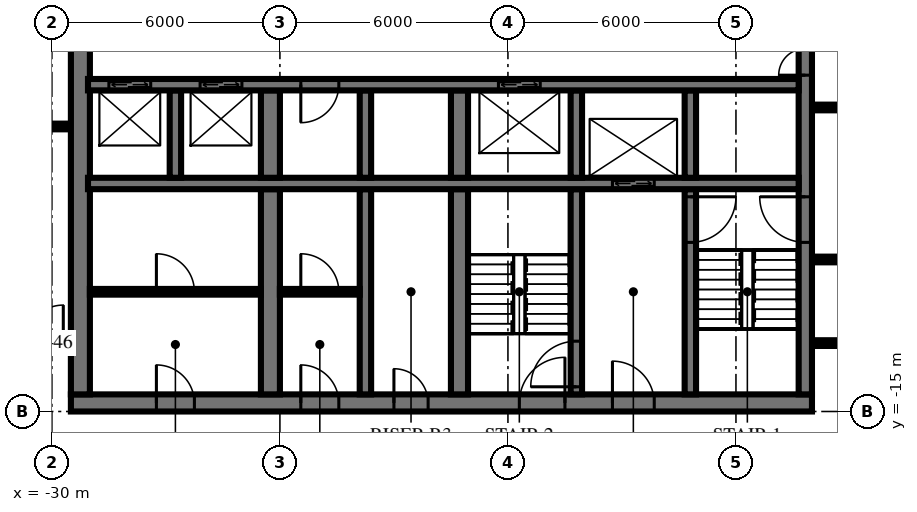
"""IFC4 building model, lengths in metres.
Left out: names, types, materials, properties, quantities, classifications, styles, units other than length and angle.
Written with IfcOpenShell. Run it as: python <this file> out.ifc"""

import sys

from ifc_helpers import new_model, si_unit, direction, frame, frame_2d, origin, place, context, subcontext, project, spatial, rectangle, extrude, element, fill, save


model = new_model("IFC4")
c1 = context("Model", 3, precision=1e-05, world=origin(), true_north=direction((0.0, 1.0)))
c2 = subcontext(c1, "Body", "Model", "MODEL_VIEW")
j1 = project(units=[si_unit("LENGTHUNIT", "METRE"), si_unit("PLANEANGLEUNIT", "RADIAN")], contexts=[c1])
p1 = place(None, origin())
s1 = spatial("IfcSite", under=j1, at=p1, CompositionType="ELEMENT")
p2 = place(p1, origin())
s2 = spatial("IfcBuilding", under=s1, at=p2, CompositionType="ELEMENT")
p3 = place(p2, frame((0.0, 0.0, 18.0)))
s3 = spatial("IfcBuildingStorey", under=s2, at=p3, CompositionType="ELEMENT", Elevation=18.0)
p4 = place(p3, frame((-29.5, -14.775, 0.0), z_axis=(0.0, 0.0, 1.0), x_axis=(1.0, 0.0, 0.0)))
e1 = element("IfcWall", 1, at=p4, inside=s3, PredefinedType="SHEAR", context=c2, shape_type="SweptSolid", body=[
    extrude(rectangle(XDim=19.5, YDim=0.45, at=frame_2d((9.75, 0.0))), origin(), (0.0, 0.0, 1.0), 6.0),
])
p5 = place(p4, frame((11.8, 0.0, 0.0)))
e2 = element("IfcOpeningElement", 2, at=p5, cuts=e1, PredefinedType="OPENING", context=c2, shape_type="SweptSolid", body=[
    extrude(rectangle(XDim=1.2, YDim=2.1, at=frame_2d((0.6, 1.05))), frame((0.0, 0.235, 0.0), z_axis=(0.0, -1.0, 0.0), x_axis=(1.0, 0.0, 0.0)), (0.0, 0.0, 1.0), 0.47),
])
p6 = place(p4, frame((14.25, 0.0, 0.0)))
e3 = element("IfcOpeningElement", 3, at=p6, cuts=e1, PredefinedType="OPENING", context=c2, shape_type="SweptSolid", body=[
    extrude(rectangle(XDim=1.1, YDim=2.1, at=frame_2d((0.55, 1.05))), frame((0.0, 0.235, 0.0), z_axis=(0.0, -1.0, 0.0), x_axis=(1.0, 0.0, 0.0)), (0.0, 0.0, 1.0), 0.47),
])
p7 = place(p4, frame((8.5, 0.0, 0.0)))
e4 = element("IfcOpeningElement", 4, at=p7, cuts=e1, PredefinedType="OPENING", context=c2, shape_type="SweptSolid", body=[
    extrude(rectangle(XDim=0.9, YDim=2.1, at=frame_2d((0.45, 1.05))), frame((0.0, 0.235, 0.0), z_axis=(0.0, -1.0, 0.0), x_axis=(1.0, 0.0, 0.0)), (0.0, 0.0, 1.0), 0.47),
])
p8 = place(p4, frame((6.05, 0.0, 0.0)))
e5 = element("IfcOpeningElement", 5, at=p8, cuts=e1, PredefinedType="OPENING", context=c2, shape_type="SweptSolid", body=[
    extrude(rectangle(XDim=1.0, YDim=2.1, at=frame_2d((0.5, 1.05))), frame((0.0, 0.235, 0.0), z_axis=(0.0, -1.0, 0.0), x_axis=(1.0, 0.0, 0.0)), (0.0, 0.0, 1.0), 0.47),
])
p9 = place(p4, frame((2.25, 0.0, 0.0)))
e6 = element("IfcOpeningElement", 6, at=p9, cuts=e1, PredefinedType="OPENING", context=c2, shape_type="SweptSolid", body=[
    extrude(rectangle(XDim=1.0, YDim=2.1, at=frame_2d((0.5, 1.05))), frame((0.0, 0.235, 0.0), z_axis=(0.0, -1.0, 0.0), x_axis=(1.0, 0.0, 0.0)), (0.0, 0.0, 1.0), 0.47),
])
p10 = place(p3, frame((-10.175, -14.55, 0.0), z_axis=(0.0, 0.0, 1.0), x_axis=(0.0, 1.0, 0.0)))
e7 = element("IfcWall", 7, at=p10, inside=s3, PredefinedType="SHEAR", context=c2, shape_type="SweptSolid", body=[
    extrude(rectangle(XDim=14.1, YDim=0.35, at=frame_2d((7.05, 0.0))), origin(), (0.0, 0.0, 1.0), 6.0),
])
p11 = place(p10, frame((8.4, 0.0, 0.0)))
e8 = element("IfcOpeningElement", 8, at=p11, cuts=e7, PredefinedType="OPENING", context=c2, shape_type="SweptSolid", body=[
    extrude(rectangle(XDim=1.4, YDim=2.4, at=frame_2d((0.7, 1.2))), frame((0.0, 0.185, 0.0), z_axis=(0.0, -1.0, 0.0), x_axis=(1.0, 0.0, 0.0)), (0.0, 0.0, 1.0), 0.37),
])
p12 = place(p10, frame((10.0, 0.0, 0.0)))
e9 = element("IfcOpeningElement", 9, at=p12, cuts=e7, PredefinedType="OPENING", context=c2, shape_type="SweptSolid", body=[
    extrude(rectangle(XDim=1.4, YDim=2.4, at=frame_2d((0.7, 1.2))), frame((0.0, 0.185, 0.0), z_axis=(0.0, -1.0, 0.0), x_axis=(1.0, 0.0, 0.0)), (0.0, 0.0, 1.0), 0.37),
])
p13 = place(p10, frame((4.0, 0.0, 0.0)))
e10 = element("IfcOpeningElement", 10, at=p13, cuts=e7, PredefinedType="OPENING", context=c2, shape_type="SweptSolid", body=[
    extrude(rectangle(XDim=1.2, YDim=2.1, at=frame_2d((0.6, 1.05))), frame((0.0, 0.185, 0.0), z_axis=(0.0, -1.0, 0.0), x_axis=(1.0, 0.0, 0.0)), (0.0, 0.0, 1.0), 0.37),
])
p14 = place(p3, frame((-29.25, -14.55, 0.0), z_axis=(0.0, 0.0, 1.0), x_axis=(0.0, 1.0, 0.0)))
e11 = element("IfcWall", 11, at=p14, inside=s3, PredefinedType="SHEAR", context=c2, shape_type="SweptSolid", body=[
    extrude(rectangle(XDim=14.1, YDim=0.5, at=frame_2d((7.05, 0.0))), origin(), (0.0, 0.0, 1.0), 6.0),
])
p15 = place(p3, frame((-29.05, -6.4, 0.0), z_axis=(0.0, 0.0, 1.0), x_axis=(1.0, 0.0, 0.0)))
e12 = element("IfcWall", 12, at=p15, inside=s3, PredefinedType="SHEAR", context=c2, shape_type="SweptSolid", body=[
    extrude(rectangle(XDim=18.7, YDim=0.3, at=frame_2d((9.35, 0.0))), origin(), (0.0, 0.0, 1.0), 6.0),
])
p16 = place(p15, frame((2.95, 0.0, 0.0)))
e13 = element("IfcOpeningElement", 13, at=p16, cuts=e12, PredefinedType="OPENING", context=c2, shape_type="SweptSolid", body=[
    extrude(rectangle(XDim=1.1, YDim=2.1, at=frame_2d((0.55, 1.05))), frame((0.0, 0.16, 0.0), z_axis=(0.0, -1.0, 0.0), x_axis=(1.0, 0.0, 0.0)), (0.0, 0.0, 1.0), 0.32),
])
p17 = place(p15, frame((0.55, 0.0, 0.0)))
e14 = element("IfcOpeningElement", 14, at=p17, cuts=e12, PredefinedType="OPENING", context=c2, shape_type="SweptSolid", body=[
    extrude(rectangle(XDim=1.1, YDim=2.1, at=frame_2d((0.55, 1.05))), frame((0.0, 0.16, 0.0), z_axis=(0.0, -1.0, 0.0), x_axis=(1.0, 0.0, 0.0)), (0.0, 0.0, 1.0), 0.32),
])
p18 = place(p15, frame((10.8, 0.0, 0.0)))
e15 = element("IfcOpeningElement", 15, at=p18, cuts=e12, PredefinedType="OPENING", context=c2, shape_type="SweptSolid", body=[
    extrude(rectangle(XDim=1.1, YDim=2.1, at=frame_2d((0.55, 1.05))), frame((0.0, 0.16, 0.0), z_axis=(0.0, -1.0, 0.0), x_axis=(1.0, 0.0, 0.0)), (0.0, 0.0, 1.0), 0.32),
])
p19 = place(p15, frame((5.6, 0.0, 0.0)))
e16 = element("IfcOpeningElement", 16, at=p19, cuts=e12, PredefinedType="OPENING", context=c2, shape_type="SweptSolid", body=[
    extrude(rectangle(XDim=1.0, YDim=2.1, at=frame_2d((0.5, 1.05))), frame((0.0, 0.16, 0.0), z_axis=(0.0, -1.0, 0.0), x_axis=(1.0, 0.0, 0.0)), (0.0, 0.0, 1.0), 0.32),
])
p20 = place(p3, frame((-29.05, -9.0, 0.0), z_axis=(0.0, 0.0, 1.0), x_axis=(1.0, 0.0, 0.0)))
e17 = element("IfcWall", 17, at=p20, inside=s3, PredefinedType="SHEAR", context=c2, shape_type="SweptSolid", body=[
    extrude(rectangle(XDim=18.7, YDim=0.3, at=frame_2d((9.35, 0.0))), origin(), (0.0, 0.0, 1.0), 6.0),
])
p21 = place(p20, frame((13.8, 0.0, 0.0)))
e18 = element("IfcOpeningElement", 18, at=p21, cuts=e17, PredefinedType="OPENING", context=c2, shape_type="SweptSolid", body=[
    extrude(rectangle(XDim=1.1, YDim=2.1, at=frame_2d((0.55, 1.05))), frame((0.0, 0.16, 0.0), z_axis=(0.0, -1.0, 0.0), x_axis=(1.0, 0.0, 0.0)), (0.0, 0.0, 1.0), 0.32),
])
p22 = place(p3, frame((-13.2, -8.85, 0.0), z_axis=(0.0, 0.0, 1.0), x_axis=(0.0, 1.0, 0.0)))
e19 = element("IfcWall", 19, at=p22, inside=s3, PredefinedType="SHEAR", context=c2, shape_type="SweptSolid", body=[
    extrude(rectangle(XDim=2.3, YDim=0.3, at=frame_2d((1.15, 0.0))), origin(), (0.0, 0.0, 1.0), 6.0),
])
p23 = place(p3, frame((-13.2, -14.55, 0.0), z_axis=(0.0, 0.0, 1.0), x_axis=(0.0, 1.0, 0.0)))
e20 = element("IfcWall", 20, at=p23, inside=s3, PredefinedType="SHEAR", context=c2, shape_type="SweptSolid", body=[
    extrude(rectangle(XDim=5.4, YDim=0.3, at=frame_2d((2.7, 0.0))), origin(), (0.0, 0.0, 1.0), 6.0),
])
p24 = place(p23, frame((4.0, 0.0, 0.0)))
e21 = element("IfcOpeningElement", 21, at=p24, cuts=e20, PredefinedType="OPENING", context=c2, shape_type="SweptSolid", body=[
    extrude(rectangle(XDim=1.2, YDim=2.1, at=frame_2d((0.6, 1.05))), frame((0.0, 0.16, 0.0), z_axis=(0.0, -1.0, 0.0), x_axis=(1.0, 0.0, 0.0)), (0.0, 0.0, 1.0), 0.32),
])
p25 = place(p3, frame((-16.2, -8.85, 0.0), z_axis=(0.0, 0.0, 1.0), x_axis=(0.0, 1.0, 0.0)))
e22 = element("IfcWall", 22, at=p25, inside=s3, PredefinedType="SHEAR", context=c2, shape_type="SweptSolid", body=[
    extrude(rectangle(XDim=2.3, YDim=0.3, at=frame_2d((1.15, 0.0))), origin(), (0.0, 0.0, 1.0), 6.0),
])
p26 = place(p3, frame((-16.2, -14.55, 0.0), z_axis=(0.0, 0.0, 1.0), x_axis=(0.0, 1.0, 0.0)))
e23 = element("IfcWall", 23, at=p26, inside=s3, PredefinedType="SHEAR", context=c2, shape_type="SweptSolid", body=[
    extrude(rectangle(XDim=5.4, YDim=0.3, at=frame_2d((2.7, 0.0))), origin(), (0.0, 0.0, 1.0), 6.0),
])
p27 = place(p26, frame((0.2, 0.0, 0.0)))
e24 = element("IfcOpeningElement", 24, at=p27, cuts=e23, PredefinedType="OPENING", context=c2, shape_type="SweptSolid", body=[
    extrude(rectangle(XDim=1.2, YDim=2.1, at=frame_2d((0.6, 1.05))), frame((0.0, 0.16, 0.0), z_axis=(0.0, -1.0, 0.0), x_axis=(1.0, 0.0, 0.0)), (0.0, 0.0, 1.0), 0.32),
])
p28 = place(p3, frame((-19.275, -8.85, 0.0), z_axis=(0.0, 0.0, 1.0), x_axis=(0.0, 1.0, 0.0)))
e25 = element("IfcWall", 25, at=p28, inside=s3, PredefinedType="SHEAR", context=c2, shape_type="SweptSolid", body=[
    extrude(rectangle(XDim=2.3, YDim=0.45, at=frame_2d((1.15, 0.0))), origin(), (0.0, 0.0, 1.0), 6.0),
])
p29 = place(p3, frame((-19.275, -14.55, 0.0), z_axis=(0.0, 0.0, 1.0), x_axis=(0.0, 1.0, 0.0)))
e26 = element("IfcWall", 26, at=p29, inside=s3, PredefinedType="SHEAR", context=c2, shape_type="SweptSolid", body=[
    extrude(rectangle(XDim=5.4, YDim=0.45, at=frame_2d((2.7, 0.0))), origin(), (0.0, 0.0, 1.0), 6.0),
])
p30 = place(p3, frame((-21.75, -8.85, 0.0), z_axis=(0.0, 0.0, 1.0), x_axis=(0.0, 1.0, 0.0)))
e27 = element("IfcWall", 27, at=p30, inside=s3, PredefinedType="SHEAR", context=c2, shape_type="SweptSolid", body=[
    extrude(rectangle(XDim=2.3, YDim=0.3, at=frame_2d((1.15, 0.0))), origin(), (0.0, 0.0, 1.0), 6.0),
])
p31 = place(p3, frame((-21.75, -14.55, 0.0), z_axis=(0.0, 0.0, 1.0), x_axis=(0.0, 1.0, 0.0)))
e28 = element("IfcWall", 28, at=p31, inside=s3, PredefinedType="SHEAR", context=c2, shape_type="SweptSolid", body=[
    extrude(rectangle(XDim=5.4, YDim=0.3, at=frame_2d((2.7, 0.0))), origin(), (0.0, 0.0, 1.0), 6.0),
])
p32 = place(p3, frame((-24.25, -8.85, 0.0), z_axis=(0.0, 0.0, 1.0), x_axis=(0.0, 1.0, 0.0)))
e29 = element("IfcWall", 29, at=p32, inside=s3, PredefinedType="SHEAR", context=c2, shape_type="SweptSolid", body=[
    extrude(rectangle(XDim=2.3, YDim=0.5, at=frame_2d((1.15, 0.0))), origin(), (0.0, 0.0, 1.0), 6.0),
])
p33 = place(p3, frame((-24.25, -14.55, 0.0), z_axis=(0.0, 0.0, 1.0), x_axis=(0.0, 1.0, 0.0)))
e30 = element("IfcWall", 30, at=p33, inside=s3, PredefinedType="SHEAR", context=c2, shape_type="SweptSolid", body=[
    extrude(rectangle(XDim=5.4, YDim=0.5, at=frame_2d((2.7, 0.0))), origin(), (0.0, 0.0, 1.0), 6.0),
])
p34 = place(p3, frame((-26.75, -8.85, 0.0), z_axis=(0.0, 0.0, 1.0), x_axis=(0.0, 1.0, 0.0)))
e31 = element("IfcWall", 31, at=p34, inside=s3, PredefinedType="SHEAR", context=c2, shape_type="SweptSolid", body=[
    extrude(rectangle(XDim=2.3, YDim=0.3, at=frame_2d((1.15, 0.0))), origin(), (0.0, 0.0, 1.0), 6.0),
])
p35 = place(p3, frame((-24.0, -11.85, 0.0), z_axis=(0.0, 0.0, 1.0), x_axis=(1.0, 0.0, 0.0)))
e32 = element("IfcWall", 32, at=p35, inside=s3, PredefinedType="PARTITIONING", context=c2, shape_type="SweptSolid", body=[
    extrude(rectangle(XDim=2.1, YDim=0.15, at=frame_2d((1.05, 0.0))), origin(), (0.0, 0.0, 1.0), 5.7),
])
p36 = place(p35, frame((0.55, 0.0, 0.0)))
e33 = element("IfcOpeningElement", 33, at=p36, cuts=e32, PredefinedType="OPENING", context=c2, shape_type="SweptSolid", body=[
    extrude(rectangle(XDim=1.0, YDim=2.1, at=frame_2d((0.5, 1.05))), frame((0.0, 0.085, 0.0), z_axis=(0.0, -1.0, 0.0), x_axis=(1.0, 0.0, 0.0)), (0.0, 0.0, 1.0), 0.17),
])
p37 = place(p3, frame((-29.0, -11.85, 0.0), z_axis=(0.0, 0.0, 1.0), x_axis=(1.0, 0.0, 0.0)))
e34 = element("IfcWall", 34, at=p37, inside=s3, PredefinedType="PARTITIONING", context=c2, shape_type="SweptSolid", body=[
    extrude(rectangle(XDim=4.5, YDim=0.15, at=frame_2d((2.25, 0.0))), origin(), (0.0, 0.0, 1.0), 5.7),
])
p38 = place(p37, frame((1.75, 0.0, 0.0)))
e35 = element("IfcOpeningElement", 35, at=p38, cuts=e34, PredefinedType="OPENING", context=c2, shape_type="SweptSolid", body=[
    extrude(rectangle(XDim=1.0, YDim=2.1, at=frame_2d((0.5, 1.05))), frame((0.0, 0.085, 0.0), z_axis=(0.0, -1.0, 0.0), x_axis=(1.0, 0.0, 0.0)), (0.0, 0.0, 1.0), 0.17),
])
p39 = place(p3, frame((-32.484, -13.2, 0.0), z_axis=(0.0, 0.0, 1.0), x_axis=(1.0, 0.0, 0.0)))
e36 = element("IfcWall", 36, at=p39, inside=s3, PredefinedType="PARTITIONING", context=c2, shape_type="SweptSolid", body=[
    extrude(rectangle(XDim=2.934, YDim=0.15, at=frame_2d((1.467, 0.0))), origin(), (0.0, 0.0, 1.0), 5.55),
])
p40 = place(p39, frame((1.784, 0.0, 0.0)))
e37 = element("IfcOpeningElement", 37, at=p40, cuts=e36, PredefinedType="OPENING", context=c2, shape_type="SweptSolid", body=[
    extrude(rectangle(XDim=1.0, YDim=2.1, at=frame_2d((0.5, 1.05))), frame((0.0, 0.085, 0.0), z_axis=(0.0, -1.0, 0.0), x_axis=(1.0, 0.0, 0.0)), (0.0, 0.0, 1.0), 0.17),
])
p41 = place(p3, frame((-9.95, -13.2, 0.0), z_axis=(0.0, 0.0, 1.0), x_axis=(1.0, 0.0, 0.0)))
e38 = element("IfcWall", 38, at=p41, inside=s3, PredefinedType="PARTITIONING", context=c2, shape_type="SweptSolid", body=[
    extrude(rectangle(XDim=19.9, YDim=0.15, at=frame_2d((9.95, 0.0))), origin(), (0.0, 0.0, 1.0), 5.55),
])
p42 = place(p41, frame((7.0, 0.0, 0.0)))
e39 = element("IfcOpeningElement", 39, at=p42, cuts=e38, PredefinedType="OPENING", context=c2, shape_type="SweptSolid", body=[
    extrude(rectangle(XDim=1.0, YDim=2.1, at=frame_2d((0.5, 1.05))), frame((0.0, 0.085, 0.0), z_axis=(0.0, -1.0, 0.0), x_axis=(1.0, 0.0, 0.0)), (0.0, 0.0, 1.0), 0.17),
])
p43 = place(p3, frame((-9.95, -11.0, 0.0), z_axis=(0.0, 0.0, 1.0), x_axis=(1.0, 0.0, 0.0)))
e40 = element("IfcWall", 40, at=p43, inside=s3, PredefinedType="PARTITIONING", context=c2, shape_type="SweptSolid", body=[
    extrude(rectangle(XDim=19.9, YDim=0.15, at=frame_2d((9.95, 0.0))), origin(), (0.0, 0.0, 1.0), 5.55),
])
p44 = place(p43, frame((9.45, 0.0, 0.0)))
e41 = element("IfcOpeningElement", 41, at=p44, cuts=e40, PredefinedType="OPENING", context=c2, shape_type="SweptSolid", body=[
    extrude(rectangle(XDim=1.0, YDim=2.1, at=frame_2d((0.5, 1.05))), frame((0.0, 0.085, 0.0), z_axis=(0.0, -1.0, 0.0), x_axis=(1.0, 0.0, 0.0)), (0.0, 0.0, 1.0), 0.17),
])
p45 = place(p43, frame((15.45, 0.0, 0.0)))
e42 = element("IfcOpeningElement", 42, at=p45, cuts=e40, PredefinedType="OPENING", context=c2, shape_type="SweptSolid", body=[
    extrude(rectangle(XDim=1.0, YDim=2.1, at=frame_2d((0.5, 1.05))), frame((0.0, 0.085, 0.0), z_axis=(0.0, -1.0, 0.0), x_axis=(1.0, 0.0, 0.0)), (0.0, 0.0, 1.0), 0.17),
])
p46 = place(p3, frame((-32.413, -7.5, 0.0), z_axis=(0.0, 0.0, 1.0), x_axis=(1.0, 0.0, 0.0)))
e43 = element("IfcWall", 43, at=p46, inside=s3, PredefinedType="PARTITIONING", context=c2, shape_type="SweptSolid", body=[
    extrude(rectangle(XDim=2.863, YDim=0.15, at=frame_2d((1.431, 0.0))), origin(), (0.0, 0.0, 1.0), 5.55),
])
p47 = place(p46, frame((0.881, 0.0, 0.0)))
e44 = element("IfcOpeningElement", 44, at=p47, cuts=e43, PredefinedType="OPENING", context=c2, shape_type="SweptSolid", body=[
    extrude(rectangle(XDim=0.9, YDim=2.1, at=frame_2d((0.45, 1.05))), frame((0.0, 0.085, 0.0), z_axis=(0.0, -1.0, 0.0), x_axis=(1.0, 0.0, 0.0)), (0.0, 0.0, 1.0), 0.17),
])
p48 = place(p3, frame((-9.95, -7.0, 0.0), z_axis=(0.0, 0.0, 1.0), x_axis=(1.0, 0.0, 0.0)))
e45 = element("IfcWall", 45, at=p48, inside=s3, PredefinedType="PARTITIONING", context=c2, shape_type="SweptSolid", body=[
    extrude(rectangle(XDim=19.9, YDim=0.15, at=frame_2d((9.95, 0.0))), origin(), (0.0, 0.0, 1.0), 5.55),
])
p49 = place(p48, frame((9.45, 0.0, 0.0)))
e46 = element("IfcOpeningElement", 46, at=p49, cuts=e45, PredefinedType="OPENING", context=c2, shape_type="SweptSolid", body=[
    extrude(rectangle(XDim=1.0, YDim=2.1, at=frame_2d((0.5, 1.05))), frame((0.0, 0.085, 0.0), z_axis=(0.0, -1.0, 0.0), x_axis=(1.0, 0.0, 0.0)), (0.0, 0.0, 1.0), 0.17),
])
p50 = place(p48, frame((2.0, 0.0, 0.0)))
e47 = element("IfcOpeningElement", 47, at=p50, cuts=e45, PredefinedType="OPENING", context=c2, shape_type="SweptSolid", body=[
    extrude(rectangle(XDim=1.0, YDim=2.1, at=frame_2d((0.5, 1.05))), frame((0.0, 0.085, 0.0), z_axis=(0.0, -1.0, 0.0), x_axis=(1.0, 0.0, 0.0)), (0.0, 0.0, 1.0), 0.17),
])
p51 = place(p16, origin())
e48 = element("IfcDoor", 48, at=p51, inside=s3, OperationType="DOUBLE_DOOR_SLIDING", PredefinedType="USERDEFINED", context=c2, shape_type="SweptSolid", body=[
    extrude(rectangle(XDim=1.1, YDim=2.1, at=frame_2d((0.55, 1.05))), frame((0.0, 0.025, 0.0), z_axis=(0.0, -1.0, 0.0), x_axis=(1.0, 0.0, 0.0)), (0.0, 0.0, 1.0), 0.05),
])
fill(e13, e48)
p52 = place(p17, origin())
e49 = element("IfcDoor", 49, at=p52, inside=s3, OperationType="DOUBLE_DOOR_SLIDING", PredefinedType="USERDEFINED", context=c2, shape_type="SweptSolid", body=[
    extrude(rectangle(XDim=1.1, YDim=2.1, at=frame_2d((0.55, 1.05))), frame((0.0, 0.025, 0.0), z_axis=(0.0, -1.0, 0.0), x_axis=(1.0, 0.0, 0.0)), (0.0, 0.0, 1.0), 0.05),
])
fill(e14, e49)
p53 = place(p21, origin())
e50 = element("IfcDoor", 50, at=p53, inside=s3, OperationType="DOUBLE_DOOR_SLIDING", PredefinedType="USERDEFINED", context=c2, shape_type="SweptSolid", body=[
    extrude(rectangle(XDim=1.1, YDim=2.1, at=frame_2d((0.55, 1.05))), frame((0.0, 0.025, 0.0), z_axis=(0.0, -1.0, 0.0), x_axis=(1.0, 0.0, 0.0)), (0.0, 0.0, 1.0), 0.05),
])
fill(e18, e50)
p54 = place(p18, origin())
e51 = element("IfcDoor", 51, at=p54, inside=s3, OperationType="DOUBLE_DOOR_SLIDING", PredefinedType="USERDEFINED", context=c2, shape_type="SweptSolid", body=[
    extrude(rectangle(XDim=1.1, YDim=2.1, at=frame_2d((0.55, 1.05))), frame((0.0, 0.025, 0.0), z_axis=(0.0, -1.0, 0.0), x_axis=(1.0, 0.0, 0.0)), (0.0, 0.0, 1.0), 0.05),
])
fill(e15, e51)
p55 = place(p11, origin())
e52 = element("IfcDoor", 52, at=p55, inside=s3, OperationType="DOUBLE_DOOR_SINGLE_SWING", PredefinedType="DOOR", context=c2, shape_type="SweptSolid", body=[
    extrude(rectangle(XDim=1.4, YDim=2.4, at=frame_2d((0.7, 1.2))), frame((0.0, 0.025, 0.0), z_axis=(0.0, -1.0, 0.0), x_axis=(1.0, 0.0, 0.0)), (0.0, 0.0, 1.0), 0.05),
])
fill(e8, e52)
p56 = place(p13, origin())
e53 = element("IfcDoor", 53, at=p56, inside=s3, OperationType="SINGLE_SWING_LEFT", PredefinedType="DOOR", context=c2, shape_type="SweptSolid", body=[
    extrude(rectangle(XDim=1.2, YDim=2.1, at=frame_2d((0.6, 1.05))), frame((0.0, 0.025, 0.0), z_axis=(0.0, -1.0, 0.0), x_axis=(1.0, 0.0, 0.0)), (0.0, 0.0, 1.0), 0.05),
])
fill(e10, e53)
p57 = place(p5, origin())
e54 = element("IfcDoor", 54, at=p57, inside=s3, OperationType="SINGLE_SWING_LEFT", PredefinedType="DOOR", context=c2, shape_type="SweptSolid", body=[
    extrude(rectangle(XDim=1.2, YDim=2.1, at=frame_2d((0.6, 1.05))), frame((0.0, 0.025, 0.0), z_axis=(0.0, -1.0, 0.0), x_axis=(1.0, 0.0, 0.0)), (0.0, 0.0, 1.0), 0.05),
])
fill(e2, e54)
p58 = place(p6, origin())
e55 = element("IfcDoor", 55, at=p58, inside=s3, OperationType="SINGLE_SWING_RIGHT", PredefinedType="DOOR", context=c2, shape_type="SweptSolid", body=[
    extrude(rectangle(XDim=1.1, YDim=2.1, at=frame_2d((0.55, 1.05))), frame((0.0, 0.025, 0.0), z_axis=(0.0, -1.0, 0.0), x_axis=(1.0, 0.0, 0.0)), (0.0, 0.0, 1.0), 0.05),
])
fill(e3, e55)
p59 = place(p7, origin())
e56 = element("IfcDoor", 56, at=p59, inside=s3, OperationType="SINGLE_SWING_RIGHT", PredefinedType="DOOR", context=c2, shape_type="SweptSolid", body=[
    extrude(rectangle(XDim=0.9, YDim=2.1, at=frame_2d((0.45, 1.05))), frame((0.0, 0.025, 0.0), z_axis=(0.0, -1.0, 0.0), x_axis=(1.0, 0.0, 0.0)), (0.0, 0.0, 1.0), 0.05),
])
fill(e4, e56)
p60 = place(p8, origin())
e57 = element("IfcDoor", 57, at=p60, inside=s3, OperationType="SINGLE_SWING_RIGHT", PredefinedType="DOOR", context=c2, shape_type="SweptSolid", body=[
    extrude(rectangle(XDim=1.0, YDim=2.1, at=frame_2d((0.5, 1.05))), frame((0.0, 0.025, 0.0), z_axis=(0.0, -1.0, 0.0), x_axis=(1.0, 0.0, 0.0)), (0.0, 0.0, 1.0), 0.05),
])
fill(e5, e57)
p61 = place(p9, origin())
e58 = element("IfcDoor", 58, at=p61, inside=s3, OperationType="SINGLE_SWING_RIGHT", PredefinedType="DOOR", context=c2, shape_type="SweptSolid", body=[
    extrude(rectangle(XDim=1.0, YDim=2.1, at=frame_2d((0.5, 1.05))), frame((0.0, 0.105, 0.0), z_axis=(0.0, -1.0, 0.0), x_axis=(1.0, 0.0, 0.0)), (0.0, 0.0, 1.0), 0.05),
])
fill(e6, e58)
p62 = place(p19, frame((0.5, 0.0, 0.0), z_axis=(0.0, 0.0, 1.0), x_axis=(-1.0, 0.0, 0.0)))
e59 = element("IfcDoor", 59, at=p62, inside=s3, OperationType="SINGLE_SWING_LEFT", PredefinedType="DOOR", context=c2, shape_type="SweptSolid", body=[
    extrude(rectangle(XDim=1.0, YDim=2.1, at=frame_2d((0.0, 1.05))), frame((0.0, -0.025, 0.0), z_axis=(0.0, 1.0, 0.0), x_axis=(-1.0, 0.0, 0.0)), (0.0, 0.0, 1.0), 0.05),
])
fill(e16, e59)
p63 = place(p24, frame((0.6, 0.0, 0.0), z_axis=(0.0, 0.0, 1.0), x_axis=(-1.0, 0.0, 0.0)))
e60 = element("IfcDoor", 60, at=p63, inside=s3, OperationType="SINGLE_SWING_RIGHT", PredefinedType="DOOR", context=c2, shape_type="SweptSolid", body=[
    extrude(rectangle(XDim=1.2, YDim=2.1, at=frame_2d((0.0, 1.05))), frame((0.0, -0.025, 0.0), z_axis=(0.0, 1.0, 0.0), x_axis=(-1.0, 0.0, 0.0)), (0.0, 0.0, 1.0), 0.05),
])
fill(e21, e60)
p64 = place(p27, origin())
e61 = element("IfcDoor", 61, at=p64, inside=s3, OperationType="SINGLE_SWING_RIGHT", PredefinedType="DOOR", context=c2, shape_type="SweptSolid", body=[
    extrude(rectangle(XDim=1.2, YDim=2.1, at=frame_2d((0.6, 1.05))), frame((0.0, 0.025, 0.0), z_axis=(0.0, -1.0, 0.0), x_axis=(1.0, 0.0, 0.0)), (0.0, 0.0, 1.0), 0.05),
])
fill(e24, e61)
p65 = place(p36, origin())
e62 = element("IfcDoor", 62, at=p65, inside=s3, OperationType="SINGLE_SWING_RIGHT", PredefinedType="DOOR", context=c2, shape_type="SweptSolid", body=[
    extrude(rectangle(XDim=1.0, YDim=2.1, at=frame_2d((0.5, 1.05))), frame((0.0, 0.025, 0.0), z_axis=(0.0, -1.0, 0.0), x_axis=(1.0, 0.0, 0.0)), (0.0, 0.0, 1.0), 0.05),
])
fill(e33, e62)
p66 = place(p38, origin())
e63 = element("IfcDoor", 63, at=p66, inside=s3, OperationType="SINGLE_SWING_RIGHT", PredefinedType="DOOR", context=c2, shape_type="SweptSolid", body=[
    extrude(rectangle(XDim=1.0, YDim=2.1, at=frame_2d((0.5, 1.05))), frame((0.0, 0.025, 0.0), z_axis=(0.0, -1.0, 0.0), x_axis=(1.0, 0.0, 0.0)), (0.0, 0.0, 1.0), 0.05),
])
fill(e35, e63)
p67 = place(p40, origin())
e64 = element("IfcDoor", 64, at=p67, inside=s3, OperationType="SINGLE_SWING_LEFT", PredefinedType="DOOR", context=c2, shape_type="SweptSolid", body=[
    extrude(rectangle(XDim=1.0, YDim=2.1, at=frame_2d((0.5, 1.05))), frame((0.0, 0.025, 0.0), z_axis=(0.0, -1.0, 0.0), x_axis=(1.0, 0.0, 0.0)), (0.0, 0.0, 1.0), 0.05),
])
fill(e37, e64)
save(model, sys.argv[1])
